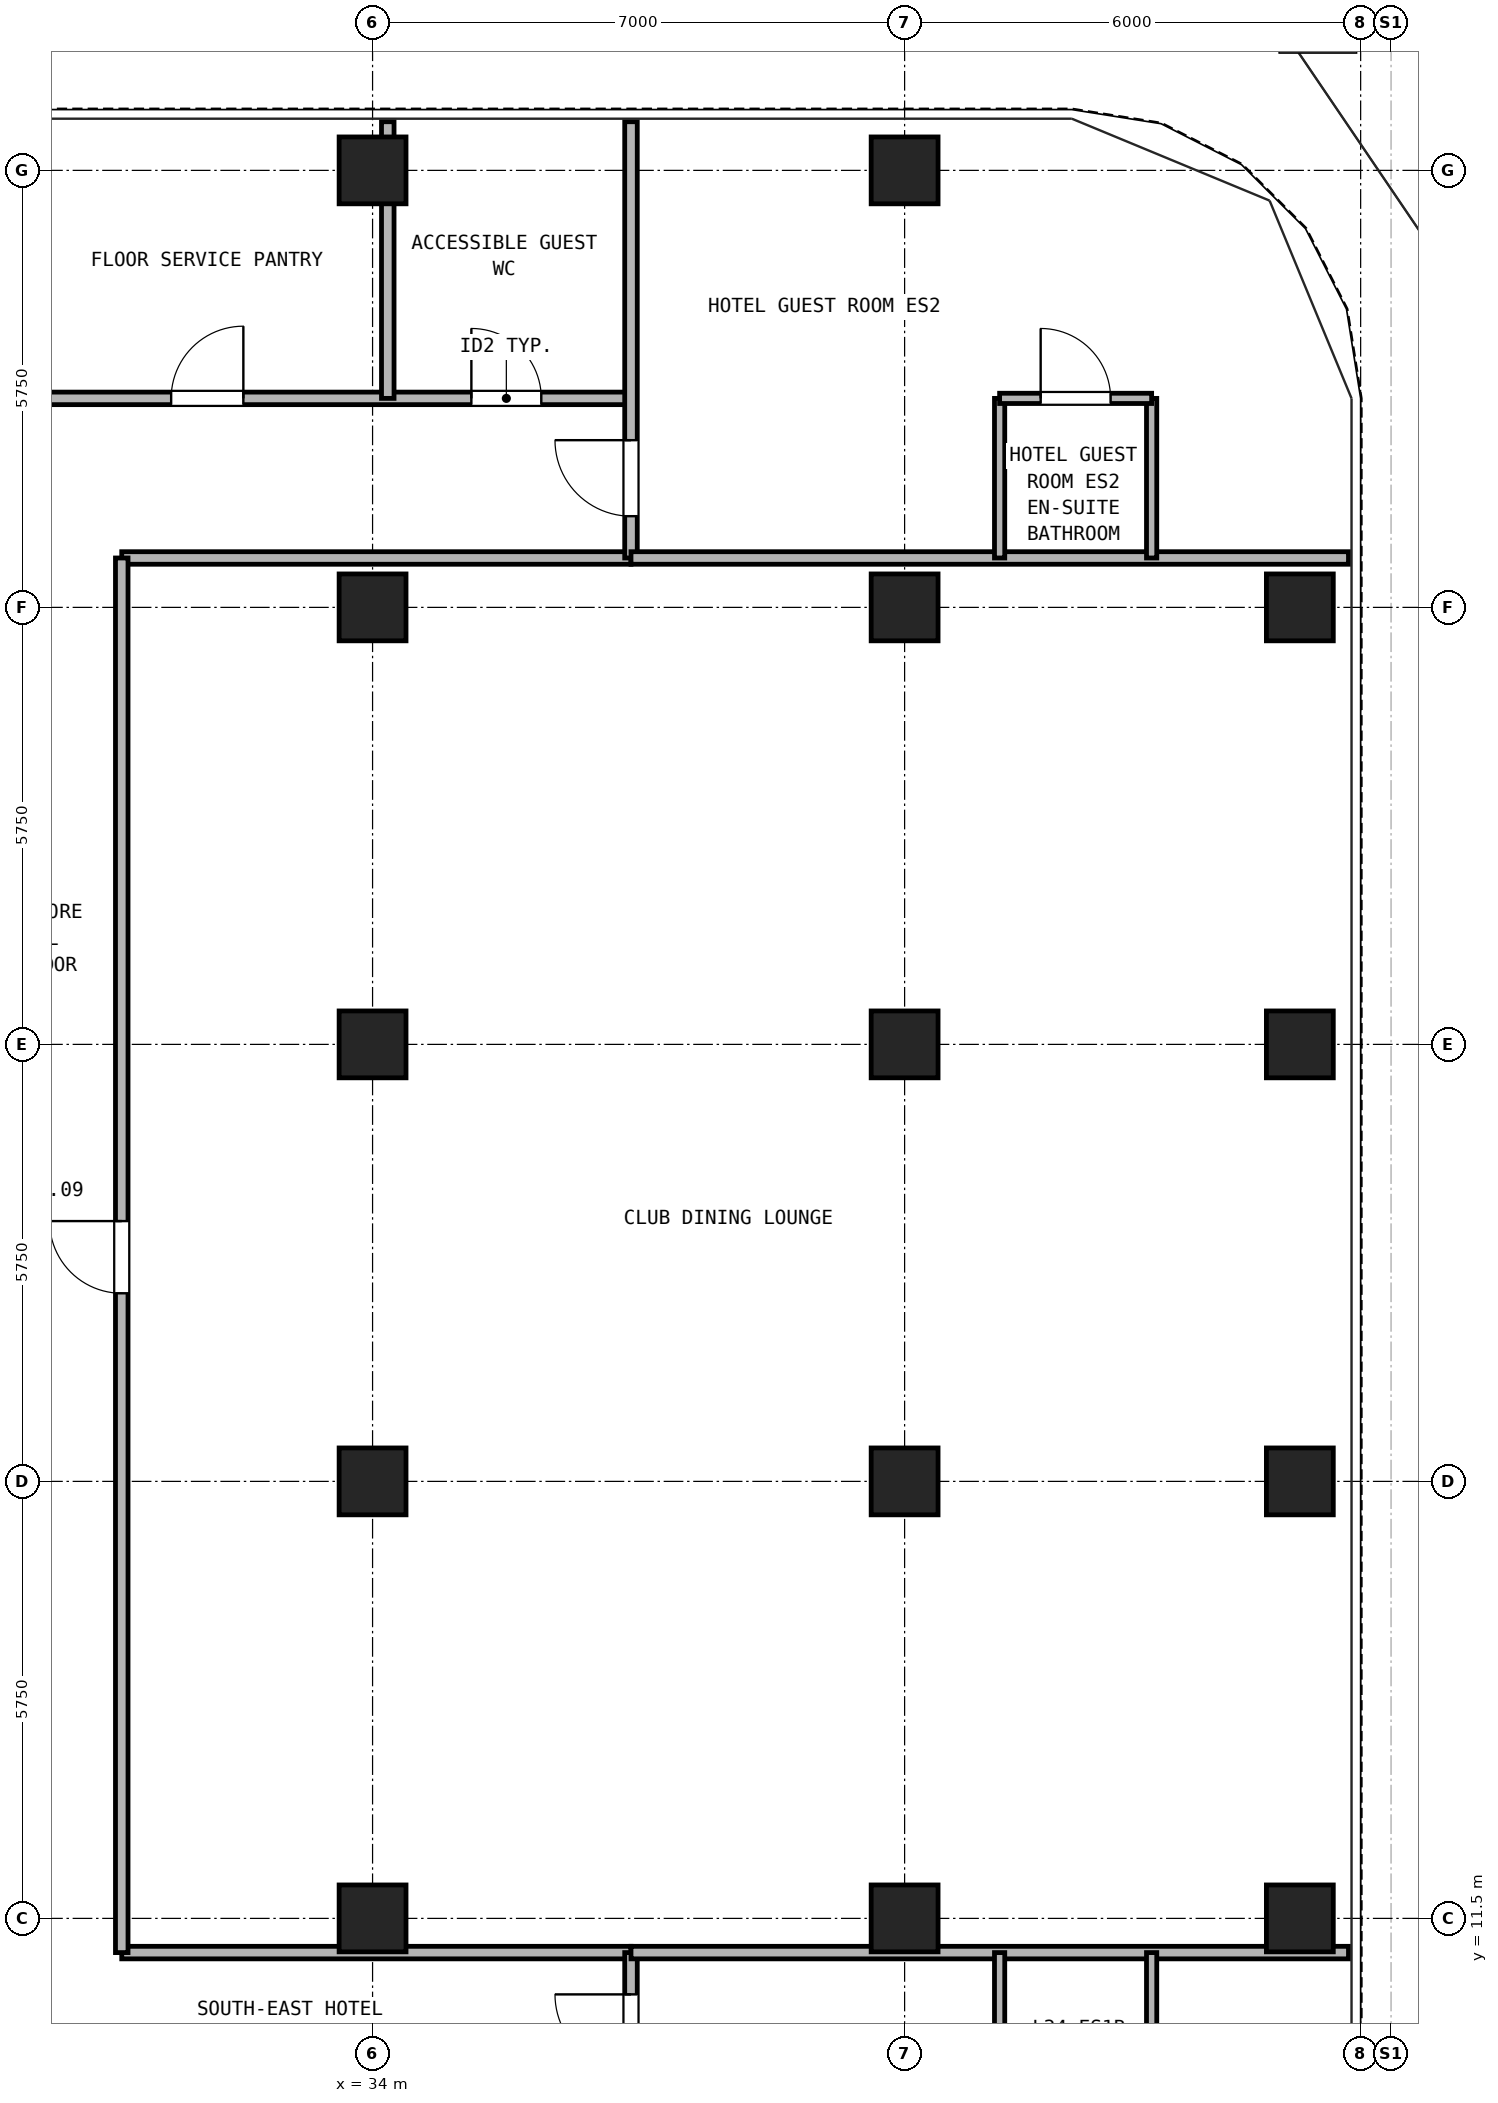
"""IFC4 building model, lengths in metres.
Left out: names, types, materials, properties, quantities, classifications, styles, units other than length and angle.
Written with IfcOpenShell. Run it as: python <this file> out.ifc"""

import sys

from ifc_helpers import new_model, si_unit, direction, frame, frame_2d, origin, origin_2d, place, context, subcontext, project, spatial, rectangle, hollow_rectangle, extrude, source, transform, mapped, element, fill, save


model = new_model("IFC4")
c1 = context("Model", 3, precision=1e-05, world=origin(), true_north=direction((0.0, 1.0)))
c2 = subcontext(c1, "Body", "Model", "MODEL_VIEW")
j1 = project(units=[si_unit("LENGTHUNIT", "METRE"), si_unit("PLANEANGLEUNIT", "RADIAN")], contexts=[c1])
p1 = place(None, origin())
s1 = spatial("IfcSite", under=j1, at=p1, CompositionType="ELEMENT")
p2 = place(p1, origin())
s2 = spatial("IfcBuilding", under=s1, at=p2, CompositionType="ELEMENT")
p3 = place(p2, frame((0.0, 0.0, 124.7)))
s3 = spatial("IfcBuildingStorey", under=s2, at=p3, CompositionType="ELEMENT", Elevation=124.7)
m1 = source(origin(), c2, "Body", "SweptSolid", [
    extrude(hollow_rectangle(XDim=0.88, YDim=0.88, WallThickness=0.05, at=origin_2d()), origin(), (0.0, 0.0, 1.0), 2.95),
])
for number, where, z_axis, x_axis in (
    (1, (34.0, 34.5, 0.0), (0.0, 0.0, 1.0), (1.0, 0.0, 0.0)),
    (2, (41.0, 34.5, 0.0), (0.0, 0.0, 1.0), (1.0, 0.0, 0.0)),
    (3, (46.2, 11.5, 0.0), (0.0, 0.0, 1.0), (1.0, 0.0, 0.0)),
    (4, (46.2, 17.25, 0.0), (0.0, 0.0, 1.0), (1.0, 0.0, 0.0)),
    (5, (46.2, 23.0, 0.0), (0.0, 0.0, 1.0), (1.0, 0.0, 0.0)),
    (6, (46.2, 28.75, 0.0), (0.0, 0.0, 1.0), (1.0, 0.0, 0.0)),
    (7, (34.0, 11.5, 0.0), (0.0, 0.0, 1.0), (1.0, 0.0, 0.0)),
    (8, (34.0, 17.25, 0.0), (0.0, 0.0, 1.0), (1.0, 0.0, 0.0)),
    (9, (34.0, 23.0, 0.0), (0.0, 0.0, 1.0), (1.0, 0.0, 0.0)),
    (10, (34.0, 28.75, 0.0), (0.0, 0.0, 1.0), (1.0, 0.0, 0.0)),
    (11, (41.0, 11.5, 0.0), (0.0, 0.0, 1.0), (1.0, 0.0, 0.0)),
    (12, (41.0, 17.25, 0.0), (0.0, 0.0, 1.0), (1.0, 0.0, 0.0)),
    (13, (41.0, 23.0, 0.0), (0.0, 0.0, 1.0), (1.0, 0.0, 0.0)),
    (14, (41.0, 28.75, 0.0), (0.0, 0.0, 1.0), (1.0, 0.0, 0.0)),
):
    element("IfcColumn", number, at=place(p3, frame(where, z_axis=z_axis, x_axis=x_axis)), inside=s3, PredefinedType="COLUMN", context=c2, shape_type="MappedRepresentation", body=[
        mapped(m1, transform((0.0, 0.0, 0.0), x_axis=(1.0, 0.0, 0.0), y_axis=(0.0, 1.0, 0.0), z_axis=(0.0, 0.0, 1.0), scale=1.0)),
    ])
p4 = place(p3, frame((9.6, 31.5, 0.0), z_axis=(0.0, 0.0, 1.0), x_axis=(1.0, 0.0, 0.0)))
e15 = element("IfcWall", 15, at=p4, inside=s3, PredefinedType="PARTITIONING", context=c2, shape_type="SweptSolid", body=[
    extrude(rectangle(XDim=27.8, YDim=0.165, at=frame_2d((13.9, 0.0))), origin(), (0.0, 0.0, 1.0), 2.583),
])
p5 = place(p4, frame((2.7, 0.0, 0.0)))
e16 = element("IfcOpeningElement", 16, at=p5, cuts=e15, PredefinedType="OPENING", context=c2, shape_type="SweptSolid", body=[
    extrude(rectangle(XDim=0.95, YDim=2.15, at=frame_2d((0.475, 1.075))), frame((0.0, 0.093, 0.0), z_axis=(0.0, -1.0, 0.0), x_axis=(1.0, 0.0, 0.0)), (0.0, 0.0, 1.0), 0.185),
])
p6 = place(p4, frame((9.4, 0.0, 0.0)))
e17 = element("IfcOpeningElement", 17, at=p6, cuts=e15, PredefinedType="OPENING", context=c2, shape_type="SweptSolid", body=[
    extrude(rectangle(XDim=0.95, YDim=2.15, at=frame_2d((0.475, 1.075))), frame((0.0, 0.093, 0.0), z_axis=(0.0, -1.0, 0.0), x_axis=(1.0, 0.0, 0.0)), (0.0, 0.0, 1.0), 0.185),
])
p7 = place(p4, frame((16.15, 0.0, 0.0)))
e18 = element("IfcOpeningElement", 18, at=p7, cuts=e15, PredefinedType="OPENING", context=c2, shape_type="SweptSolid", body=[
    extrude(rectangle(XDim=0.95, YDim=2.15, at=frame_2d((0.475, 1.075))), frame((0.0, 0.093, 0.0), z_axis=(0.0, -1.0, 0.0), x_axis=(1.0, 0.0, 0.0)), (0.0, 0.0, 1.0), 0.185),
])
p8 = place(p4, frame((21.75, 0.0, 0.0)))
e19 = element("IfcOpeningElement", 19, at=p8, cuts=e15, PredefinedType="OPENING", context=c2, shape_type="SweptSolid", body=[
    extrude(rectangle(XDim=0.95, YDim=2.15, at=frame_2d((0.475, 1.075))), frame((0.0, 0.093, 0.0), z_axis=(0.0, -1.0, 0.0), x_axis=(1.0, 0.0, 0.0)), (0.0, 0.0, 1.0), 0.185),
])
p9 = place(p4, frame((25.7, 0.0, 0.0)))
e20 = element("IfcOpeningElement", 20, at=p9, cuts=e15, PredefinedType="OPENING", context=c2, shape_type="SweptSolid", body=[
    extrude(rectangle(XDim=0.92, YDim=2.1, at=frame_2d((0.46, 1.05))), frame((0.0, 0.093, 0.0), z_axis=(0.0, -1.0, 0.0), x_axis=(1.0, 0.0, 0.0)), (0.0, 0.0, 1.0), 0.185),
])
for number, where, z_axis, x_axis in (
    (21, (30.7, 11.05, 0.0), (0.0, 0.0, 1.0), (1.0, 0.0, 0.0)),
    (22, (30.7, 29.4, 0.0), (0.0, 0.0, 1.0), (1.0, 0.0, 0.0)),
):
    element("IfcWall", number, at=place(p3, frame(where, z_axis=z_axis, x_axis=x_axis)), inside=s3, PredefinedType="PARTITIONING", context=c2, shape_type="SweptSolid", body=[
        extrude(rectangle(XDim=6.7, YDim=0.165, at=frame_2d((3.35, 0.0))), origin(), (0.0, 0.0, 1.0), 2.95),
    ])
p10 = place(p3, frame((30.7, 11.05, 0.0), z_axis=(0.0, 0.0, 1.0), x_axis=(0.0, 1.0, 0.0)))
e23 = element("IfcWall", 23, at=p10, inside=s3, PredefinedType="PARTITIONING", context=c2, shape_type="SweptSolid", body=[
    extrude(rectangle(XDim=18.35, YDim=0.165, at=frame_2d((9.175, 0.0))), origin(), (0.0, 0.0, 1.0), 2.95),
])
p11 = place(p10, frame((8.675, 0.0, 0.0)))
e24 = element("IfcOpeningElement", 24, at=p11, cuts=e23, PredefinedType="OPENING", context=c2, shape_type="SweptSolid", body=[
    extrude(rectangle(XDim=0.95, YDim=2.15, at=frame_2d((0.475, 1.075))), frame((0.0, 0.093, 0.0), z_axis=(0.0, -1.0, 0.0), x_axis=(1.0, 0.0, 0.0)), (0.0, 0.0, 1.0), 0.185),
])
p12 = place(p3, frame((37.4, 0.16, 0.0), z_axis=(0.0, 0.0, 1.0), x_axis=(0.0, 1.0, 0.0)))
e25 = element("IfcWall", 25, at=p12, inside=s3, PredefinedType="PARTITIONING", context=c2, shape_type="SweptSolid", body=[
    extrude(rectangle(XDim=10.89, YDim=0.165, at=frame_2d((5.445, 0.0))), origin(), (0.0, 0.0, 1.0), 2.95),
])
p13 = place(p12, frame((9.34, 0.0, 0.0)))
e26 = element("IfcOpeningElement", 26, at=p13, cuts=e25, PredefinedType="OPENING", context=c2, shape_type="SweptSolid", body=[
    extrude(rectangle(XDim=1.0, YDim=2.15, at=frame_2d((0.5, 1.075))), frame((0.0, 0.093, 0.0), z_axis=(0.0, -1.0, 0.0), x_axis=(1.0, 0.0, 0.0)), (0.0, 0.0, 1.0), 0.185),
])
p14 = place(p3, frame((37.4, 29.4, 0.0), z_axis=(0.0, 0.0, 1.0), x_axis=(0.0, 1.0, 0.0)))
e27 = element("IfcWall", 27, at=p14, inside=s3, PredefinedType="PARTITIONING", context=c2, shape_type="SweptSolid", body=[
    extrude(rectangle(XDim=5.74, YDim=0.165, at=frame_2d((2.87, 0.0))), origin(), (0.0, 0.0, 1.0), 2.95),
])
p15 = place(p14, frame((0.55, 0.0, 0.0)))
e28 = element("IfcOpeningElement", 28, at=p15, cuts=e27, PredefinedType="OPENING", context=c2, shape_type="SweptSolid", body=[
    extrude(rectangle(XDim=1.0, YDim=2.15, at=frame_2d((0.5, 1.075))), frame((0.0, 0.093, 0.0), z_axis=(0.0, -1.0, 0.0), x_axis=(1.0, 0.0, 0.0)), (0.0, 0.0, 1.0), 0.185),
])
for number, where, z_axis, x_axis in (
    (29, (37.4, 11.05, 0.0), (0.0, 0.0, 1.0), (1.0, 0.0, 0.0)),
    (30, (37.4, 29.4, 0.0), (0.0, 0.0, 1.0), (1.0, 0.0, 0.0)),
):
    element("IfcWall", number, at=place(p3, frame(where, z_axis=z_axis, x_axis=x_axis)), inside=s3, PredefinedType="PARTITIONING", context=c2, shape_type="SweptSolid", body=[
        extrude(rectangle(XDim=9.44, YDim=0.165, at=frame_2d((4.72, 0.0))), origin(), (0.0, 0.0, 1.0), 2.95),
    ])
for number, where, z_axis, x_axis in (
    (31, (42.25, 8.95, 0.0), (0.0, 0.0, 1.0), (0.0, 1.0, 0.0)),
    (32, (44.25, 8.95, 0.0), (0.0, 0.0, 1.0), (0.0, 1.0, 0.0)),
    (33, (42.25, 29.4, 0.0), (0.0, 0.0, 1.0), (0.0, 1.0, 0.0)),
    (34, (44.25, 29.4, 0.0), (0.0, 0.0, 1.0), (0.0, 1.0, 0.0)),
):
    element("IfcWall", number, at=place(p3, frame(where, z_axis=z_axis, x_axis=x_axis)), inside=s3, PredefinedType="PARTITIONING", context=c2, shape_type="SweptSolid", body=[
        extrude(rectangle(XDim=2.1, YDim=0.135, at=frame_2d((1.05, 0.0))), origin(), (0.0, 0.0, 1.0), 2.95),
    ])
p16 = place(p3, frame((42.25, 31.5, 0.0), z_axis=(0.0, 0.0, 1.0), x_axis=(1.0, 0.0, 0.0)))
e35 = element("IfcWall", 35, at=p16, inside=s3, PredefinedType="PARTITIONING", context=c2, shape_type="SweptSolid", body=[
    extrude(rectangle(XDim=2.0, YDim=0.135, at=frame_2d((1.0, 0.0))), origin(), (0.0, 0.0, 1.0), 2.95),
])
p17 = place(p16, frame((0.54, 0.0, 0.0)))
e36 = element("IfcOpeningElement", 36, at=p17, cuts=e35, PredefinedType="OPENING", context=c2, shape_type="SweptSolid", body=[
    extrude(rectangle(XDim=0.92, YDim=2.1, at=frame_2d((0.46, 1.05))), frame((0.0, 0.077, 0.0), z_axis=(0.0, -1.0, 0.0), x_axis=(1.0, 0.0, 0.0)), (0.0, 0.0, 1.0), 0.155),
])
p18 = place(p3, frame((34.2, 31.5, 0.0), z_axis=(0.0, 0.0, 1.0), x_axis=(0.0, 1.0, 0.0)))
e37 = element("IfcWall", 37, at=p18, inside=s3, PredefinedType="PARTITIONING", context=c2, shape_type="SweptSolid", body=[
    extrude(rectangle(XDim=3.64, YDim=0.165, at=frame_2d((1.82, 0.0))), origin(), (0.0, 0.0, 1.0), 2.247),
])
p19 = place(p13, frame((1.0, 0.0, 0.0), z_axis=(0.0, 0.0, 1.0), x_axis=(-1.0, 0.0, 0.0)))
e38 = element("IfcDoor", 38, at=p19, inside=s3, OperationType="SINGLE_SWING_RIGHT", PredefinedType="DOOR", context=c2, shape_type="SweptSolid", body=[
    extrude(rectangle(XDim=1.0, YDim=2.15, at=frame_2d((0.5, 1.075))), frame((0.0, 0.025, 0.0), z_axis=(0.0, -1.0, 0.0), x_axis=(1.0, 0.0, 0.0)), (0.0, 0.0, 1.0), 0.05),
])
fill(e26, e38)
p20 = place(p17, frame((0.92, 0.0, 0.0), z_axis=(0.0, 0.0, 1.0), x_axis=(-1.0, 0.0, 0.0)))
e39 = element("IfcDoor", 39, at=p20, inside=s3, OperationType="SINGLE_SWING_LEFT", PredefinedType="DOOR", context=c2, shape_type="SweptSolid", body=[
    extrude(rectangle(XDim=0.92, YDim=2.1, at=frame_2d((0.46, 1.05))), frame((0.0, 0.025, 0.0), z_axis=(0.0, -1.0, 0.0), x_axis=(1.0, 0.0, 0.0)), (0.0, 0.0, 1.0), 0.05),
])
fill(e36, e39)
p21 = place(p15, frame((1.0, 0.0, 0.0), z_axis=(0.0, 0.0, 1.0), x_axis=(-1.0, 0.0, 0.0)))
e40 = element("IfcDoor", 40, at=p21, inside=s3, OperationType="SINGLE_SWING_RIGHT", PredefinedType="DOOR", context=c2, shape_type="SweptSolid", body=[
    extrude(rectangle(XDim=1.0, YDim=2.15, at=frame_2d((0.5, 1.075))), frame((0.0, 0.025, 0.0), z_axis=(0.0, -1.0, 0.0), x_axis=(1.0, 0.0, 0.0)), (0.0, 0.0, 1.0), 0.05),
])
fill(e28, e40)
p22 = place(p8, origin())
e41 = element("IfcDoor", 41, at=p22, inside=s3, OperationType="SINGLE_SWING_RIGHT", PredefinedType="DOOR", context=c2, shape_type="SweptSolid", body=[
    extrude(rectangle(XDim=0.95, YDim=2.15, at=frame_2d((0.475, 1.075))), frame((0.0, 0.025, 0.0), z_axis=(0.0, -1.0, 0.0), x_axis=(1.0, 0.0, 0.0)), (0.0, 0.0, 1.0), 0.05),
])
fill(e19, e41)
p23 = place(p9, origin())
e42 = element("IfcDoor", 42, at=p23, inside=s3, OperationType="SINGLE_SWING_LEFT", PredefinedType="DOOR", context=c2, shape_type="SweptSolid", body=[
    extrude(rectangle(XDim=0.92, YDim=2.1, at=frame_2d((0.46, 1.05))), frame((0.0, 0.025, 0.0), z_axis=(0.0, -1.0, 0.0), x_axis=(1.0, 0.0, 0.0)), (0.0, 0.0, 1.0), 0.05),
])
fill(e20, e42)
p24 = place(p11, origin())
e43 = element("IfcDoor", 43, at=p24, inside=s3, OperationType="SINGLE_SWING_RIGHT", PredefinedType="DOOR", context=c2, shape_type="SweptSolid", body=[
    extrude(rectangle(XDim=0.95, YDim=2.15, at=frame_2d((0.475, 1.075))), frame((0.0, 0.025, 0.0), z_axis=(0.0, -1.0, 0.0), x_axis=(1.0, 0.0, 0.0)), (0.0, 0.0, 1.0), 0.05),
])
fill(e24, e43)
save(model, sys.argv[1])
